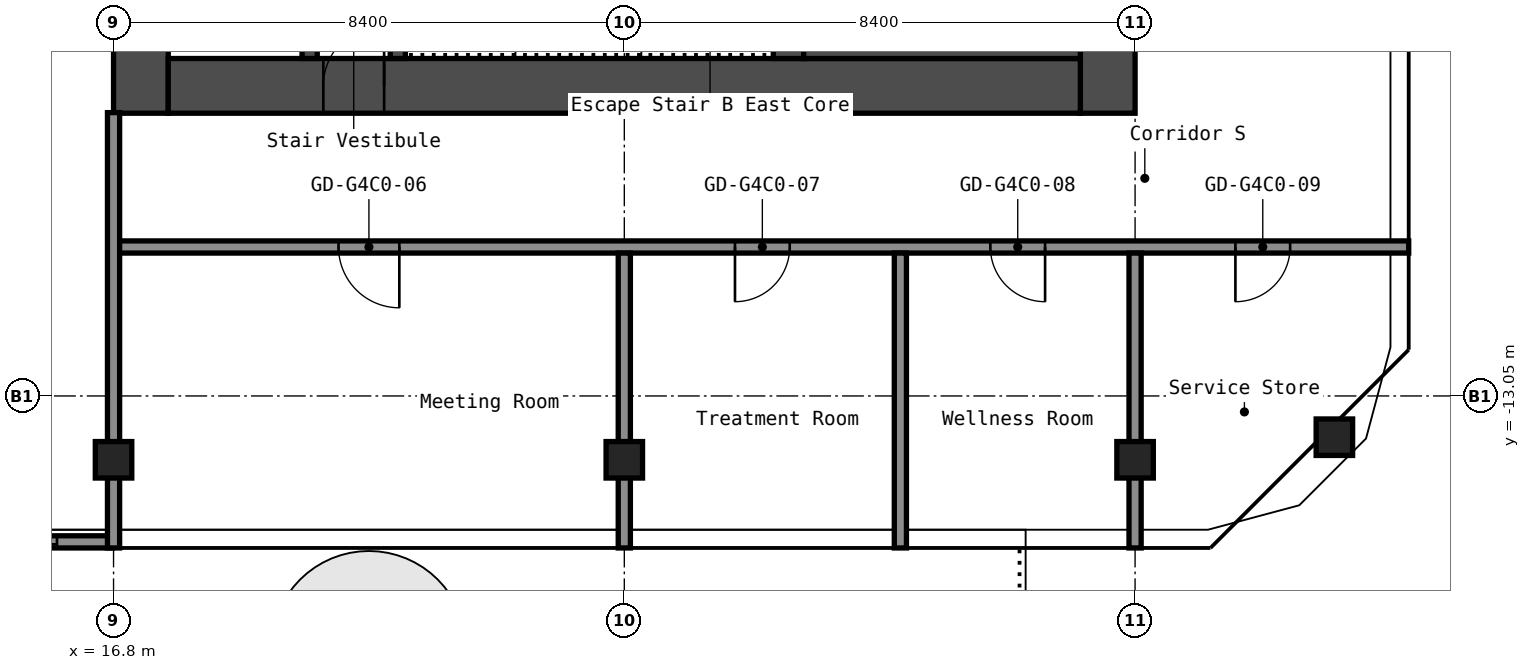
"""IFC4 building model, lengths in metres.
Left out: names, types, materials, properties, quantities, classifications, styles, units other than length and angle.
Written with IfcOpenShell. Run it as: python <this file> out.ifc"""

import sys

from ifc_helpers import new_model, si_unit, direction, frame, frame_2d, origin, origin_2d, place, context, subcontext, project, spatial, rectangle, hollow_rectangle, extrude, element, fill, save


model = new_model("IFC4")
c1 = context("Model", 3, precision=1e-05, world=origin(), true_north=direction((0.0, 1.0)))
c2 = subcontext(c1, "Body", "Model", "MODEL_VIEW")
j1 = project(units=[si_unit("LENGTHUNIT", "METRE"), si_unit("PLANEANGLEUNIT", "RADIAN")], contexts=[c1])
p1 = place(None, origin())
s1 = spatial("IfcSite", under=j1, at=p1, CompositionType="ELEMENT")
p2 = place(p1, origin())
s2 = spatial("IfcBuilding", under=s1, at=p2, CompositionType="ELEMENT")
p3 = place(p2, frame((0.0, 0.0, 193.0)))
s3 = spatial("IfcBuildingStorey", under=s2, at=p3, CompositionType="ELEMENT", Elevation=193.0)
for number, where, z_axis, x_axis in (
    (1, (16.8, -14.1, 0.0), (0.0, 0.0, 1.0), (1.0, 0.0, 0.0)),
    (2, (25.2, -14.1, 0.0), (0.0, 0.0, 1.0), (1.0, 0.0, 0.0)),
    (3, (33.6, -14.1, 0.0), (0.0, 0.0, 1.0), (1.0, 0.0, 0.0)),
    (4, (36.878, -13.729, 0.0), (0.0, 0.0, 1.0), (1.0, 0.0, 0.0)),
):
    element("IfcColumn", number, at=place(p3, frame(where, z_axis=z_axis, x_axis=x_axis)), inside=s3, PredefinedType="COLUMN", context=c2, shape_type="SweptSolid", body=[
        extrude(hollow_rectangle(XDim=0.6, YDim=0.6, WallThickness=0.025, InnerFilletRadius=0.038, OuterFilletRadius=0.062, at=origin_2d()), origin(), (0.0, 0.0, 1.0), 2.75),
    ])
p4 = place(p3, frame((17.25, -8.4, 0.0), z_axis=(0.0, 0.0, 1.0), x_axis=(0.0, 1.0, 0.0)))
e5 = element("IfcWall", 5, at=p4, inside=s3, PredefinedType="SHEAR", context=c2, shape_type="SweptSolid", body=[
    extrude(rectangle(XDim=16.8, YDim=0.9, at=frame_2d((8.4, 0.0))), origin(), (0.0, 0.0, 1.0), 2.75),
])
p5 = place(p4, frame((10.1, 0.0, 0.0)))
e6 = element("IfcOpeningElement", 6, at=p5, cuts=e5, PredefinedType="OPENING", context=c2, shape_type="SweptSolid", body=[
    extrude(rectangle(XDim=1.6, YDim=2.1, at=frame_2d((0.8, 1.05))), frame((0.0, 0.46, 0.0), z_axis=(0.0, -1.0, 0.0), x_axis=(1.0, 0.0, 0.0)), (0.0, 0.0, 1.0), 0.92),
])
p6 = place(p3, frame((33.15, -8.4, 0.0), z_axis=(0.0, 0.0, 1.0), x_axis=(0.0, 1.0, 0.0)))
e7 = element("IfcWall", 7, at=p6, inside=s3, PredefinedType="SHEAR", context=c2, shape_type="SweptSolid", body=[
    extrude(rectangle(XDim=16.8, YDim=0.9, at=frame_2d((8.4, 0.0))), origin(), (0.0, 0.0, 1.0), 2.75),
])
p7 = place(p3, frame((17.7, -7.95, 0.0), z_axis=(0.0, 0.0, 1.0), x_axis=(1.0, 0.0, 0.0)))
e8 = element("IfcWall", 8, at=p7, inside=s3, PredefinedType="SHEAR", context=c2, shape_type="SweptSolid", body=[
    extrude(rectangle(XDim=15.0, YDim=0.9, at=frame_2d((7.5, 0.0))), origin(), (0.0, 0.0, 1.0), 2.75),
])
p8 = place(p7, frame((2.55, 0.0, 0.0)))
e9 = element("IfcOpeningElement", 9, at=p8, cuts=e8, PredefinedType="OPENING", context=c2, shape_type="SweptSolid", body=[
    extrude(rectangle(XDim=1.0, YDim=2.1, at=frame_2d((0.5, 1.05))), frame((0.0, 0.46, 0.0), z_axis=(0.0, -1.0, 0.0), x_axis=(1.0, 0.0, 0.0)), (0.0, 0.0, 1.0), 0.92),
])
p9 = place(p3, frame((20.025, -7.5, 0.0), z_axis=(0.0, 0.0, 1.0), x_axis=(0.0, 1.0, 0.0)))
e10 = element("IfcWall", 10, at=p9, inside=s3, PredefinedType="SHEAR", context=c2, shape_type="SweptSolid", body=[
    extrude(rectangle(XDim=6.3, YDim=0.25, at=frame_2d((3.15, 0.0))), origin(), (0.0, 0.0, 1.0), 2.75),
])
p10 = place(p9, frame((2.4, 0.0, 0.0)))
e11 = element("IfcOpeningElement", 11, at=p10, cuts=e10, PredefinedType="OPENING", context=c2, shape_type="SweptSolid", body=[
    extrude(rectangle(XDim=1.0, YDim=2.1, at=frame_2d((0.5, 1.05))), frame((0.0, 0.135, 0.0), z_axis=(0.0, -1.0, 0.0), x_axis=(1.0, 0.0, 0.0)), (0.0, 0.0, 1.0), 0.27),
])
p11 = place(p3, frame((21.475, -7.5, 0.0), z_axis=(0.0, 0.0, 1.0), x_axis=(0.0, 1.0, 0.0)))
e12 = element("IfcWall", 12, at=p11, inside=s3, PredefinedType="SHEAR", context=c2, shape_type="SweptSolid", body=[
    extrude(rectangle(XDim=3.75, YDim=0.25, at=frame_2d((1.875, 0.0))), origin(), (0.0, 0.0, 1.0), 2.75),
])
p12 = place(p11, frame((1.3, 0.0, 0.0)))
e13 = element("IfcOpeningElement", 13, at=p12, cuts=e12, PredefinedType="OPENING", context=c2, shape_type="SweptSolid", body=[
    extrude(rectangle(XDim=1.2, YDim=2.1, at=frame_2d((0.6, 1.05))), frame((0.0, 0.135, 0.0), z_axis=(0.0, -1.0, 0.0), x_axis=(1.0, 0.0, 0.0)), (0.0, 0.0, 1.0), 0.27),
])
p13 = place(p3, frame((27.9, -7.5, 0.0), z_axis=(0.0, 0.0, 1.0), x_axis=(0.0, 1.0, 0.0)))
e14 = element("IfcWall", 14, at=p13, inside=s3, PredefinedType="SHEAR", context=c2, shape_type="SweptSolid", body=[
    extrude(rectangle(XDim=3.75, YDim=0.5, at=frame_2d((1.875, 0.0))), origin(), (0.0, 0.0, 1.0), 2.75),
])
p14 = place(p3, frame((28.15, -6.75, 0.0), z_axis=(0.0, 0.0, 1.0), x_axis=(1.0, 0.0, 0.0)))
e15 = element("IfcWall", 15, at=p14, inside=s3, PredefinedType="SHEAR", context=c2, shape_type="SweptSolid", body=[
    extrude(rectangle(XDim=4.55, YDim=1.5, at=frame_2d((2.275, 0.0))), origin(), (0.0, 0.0, 1.0), 2.75),
])
p15 = place(p3, frame((16.8, -10.6, 0.0), z_axis=(0.0, 0.0, 1.0), x_axis=(1.0, 0.0, 0.0)))
e16 = element("IfcWall", 16, at=p15, inside=s3, PredefinedType="PARTITIONING", context=c2, shape_type="SweptSolid", body=[
    extrude(rectangle(XDim=21.3, YDim=0.2, at=frame_2d((10.65, 0.0))), origin(), (0.0, 0.0, 1.0), 2.75),
])
p16 = place(p15, frame((3.7, 0.0, 0.0)))
e17 = element("IfcOpeningElement", 17, at=p16, cuts=e16, PredefinedType="OPENING", context=c2, shape_type="SweptSolid", body=[
    extrude(rectangle(XDim=1.0, YDim=2.1, at=frame_2d((0.5, 1.05))), frame((0.0, 0.11, 0.0), z_axis=(0.0, -1.0, 0.0), x_axis=(1.0, 0.0, 0.0)), (0.0, 0.0, 1.0), 0.22),
])
p17 = place(p15, frame((10.22, 0.0, 0.0)))
e18 = element("IfcOpeningElement", 18, at=p17, cuts=e16, PredefinedType="OPENING", context=c2, shape_type="SweptSolid", body=[
    extrude(rectangle(XDim=0.9, YDim=2.1, at=frame_2d((0.45, 1.05))), frame((0.0, 0.11, 0.0), z_axis=(0.0, -1.0, 0.0), x_axis=(1.0, 0.0, 0.0)), (0.0, 0.0, 1.0), 0.22),
])
p18 = place(p15, frame((14.42, 0.0, 0.0)))
e19 = element("IfcOpeningElement", 19, at=p18, cuts=e16, PredefinedType="OPENING", context=c2, shape_type="SweptSolid", body=[
    extrude(rectangle(XDim=0.9, YDim=2.1, at=frame_2d((0.45, 1.05))), frame((0.0, 0.11, 0.0), z_axis=(0.0, -1.0, 0.0), x_axis=(1.0, 0.0, 0.0)), (0.0, 0.0, 1.0), 0.22),
])
p19 = place(p15, frame((18.45, 0.0, 0.0)))
e20 = element("IfcOpeningElement", 20, at=p19, cuts=e16, PredefinedType="OPENING", context=c2, shape_type="SweptSolid", body=[
    extrude(rectangle(XDim=0.9, YDim=2.1, at=frame_2d((0.45, 1.05))), frame((0.0, 0.11, 0.0), z_axis=(0.0, -1.0, 0.0), x_axis=(1.0, 0.0, 0.0)), (0.0, 0.0, 1.0), 0.22),
])
p20 = place(p3, frame((16.8, -15.55, 0.0), z_axis=(0.0, 0.0, 1.0), x_axis=(0.0, 1.0, 0.0)))
e21 = element("IfcWall", 21, at=p20, inside=s3, PredefinedType="PARTITIONING", context=c2, shape_type="SweptSolid", body=[
    extrude(rectangle(XDim=7.16, YDim=0.2, at=frame_2d((3.58, 0.0))), origin(), (0.0, 0.0, 1.0), 2.75),
])
for number, where, z_axis, x_axis in (
    (22, (25.2, -15.55, 0.0), (0.0, 0.0, 1.0), (0.0, 1.0, 0.0)),
    (23, (29.74, -15.55, 0.0), (0.0, 0.0, 1.0), (0.0, 1.0, 0.0)),
    (24, (33.6, -15.55, 0.0), (0.0, 0.0, 1.0), (0.0, 1.0, 0.0)),
):
    element("IfcWall", number, at=place(p3, frame(where, z_axis=z_axis, x_axis=x_axis)), inside=s3, PredefinedType="PARTITIONING", context=c2, shape_type="SweptSolid", body=[
        extrude(rectangle(XDim=4.85, YDim=0.2, at=frame_2d((2.425, 0.0))), origin(), (0.0, 0.0, 1.0), 2.75),
    ])
p21 = place(p3, frame((12.56, -15.45, 0.0), z_axis=(0.0, 0.0, 1.0), x_axis=(1.0, 0.0, 0.0)))
p22 = place(p21, frame((0.91, 0.0, 0.0)))
p23 = place(p22, frame((2.4, 0.0, 0.0), z_axis=(0.0, 0.0, 1.0), x_axis=(-1.0, 0.0, 0.0)))
e25 = element("IfcDoor", 25, at=p23, inside=s3, OperationType="SLIDING_TO_LEFT", PredefinedType="DOOR", context=c2, shape_type="SweptSolid", body=[
    extrude(rectangle(XDim=2.4, YDim=2.2, at=frame_2d((1.2, 1.1))), frame((0.0, 0.025, 0.0), z_axis=(0.0, -1.0, 0.0), x_axis=(1.0, 0.0, 0.0)), (0.0, 0.0, 1.0), 0.05),
])
p24 = place(p8, origin())
e26 = element("IfcDoor", 26, at=p24, inside=s3, OperationType="SINGLE_SWING_LEFT", PredefinedType="DOOR", context=c2, shape_type="SweptSolid", body=[
    extrude(rectangle(XDim=1.0, YDim=2.1, at=frame_2d((0.5, 1.05))), frame((0.0, 0.025, 0.0), z_axis=(0.0, -1.0, 0.0), x_axis=(1.0, 0.0, 0.0)), (0.0, 0.0, 1.0), 0.05),
])
fill(e9, e26)
p25 = place(p16, origin())
e27 = element("IfcDoor", 27, at=p25, inside=s3, OperationType="SINGLE_SWING_RIGHT", PredefinedType="DOOR", context=c2, shape_type="SweptSolid", body=[
    extrude(rectangle(XDim=1.0, YDim=2.1, at=frame_2d((0.5, 1.05))), frame((0.0, 0.025, 0.0), z_axis=(0.0, -1.0, 0.0), x_axis=(1.0, 0.0, 0.0)), (0.0, 0.0, 1.0), 0.05),
])
fill(e17, e27)
p26 = place(p17, origin())
e28 = element("IfcDoor", 28, at=p26, inside=s3, OperationType="SINGLE_SWING_LEFT", PredefinedType="DOOR", context=c2, shape_type="SweptSolid", body=[
    extrude(rectangle(XDim=0.9, YDim=2.1, at=frame_2d((0.45, 1.05))), frame((0.0, 0.025, 0.0), z_axis=(0.0, -1.0, 0.0), x_axis=(1.0, 0.0, 0.0)), (0.0, 0.0, 1.0), 0.05),
])
fill(e18, e28)
p27 = place(p18, origin())
e29 = element("IfcDoor", 29, at=p27, inside=s3, OperationType="SINGLE_SWING_RIGHT", PredefinedType="DOOR", context=c2, shape_type="SweptSolid", body=[
    extrude(rectangle(XDim=0.9, YDim=2.1, at=frame_2d((0.45, 1.05))), frame((0.0, 0.025, 0.0), z_axis=(0.0, -1.0, 0.0), x_axis=(1.0, 0.0, 0.0)), (0.0, 0.0, 1.0), 0.05),
])
fill(e19, e29)
p28 = place(p19, origin())
e30 = element("IfcDoor", 30, at=p28, inside=s3, OperationType="SINGLE_SWING_LEFT", PredefinedType="DOOR", context=c2, shape_type="SweptSolid", body=[
    extrude(rectangle(XDim=0.9, YDim=2.1, at=frame_2d((0.45, 1.05))), frame((0.0, 0.025, 0.0), z_axis=(0.0, -1.0, 0.0), x_axis=(1.0, 0.0, 0.0)), (0.0, 0.0, 1.0), 0.05),
])
fill(e20, e30)
save(model, sys.argv[1])
